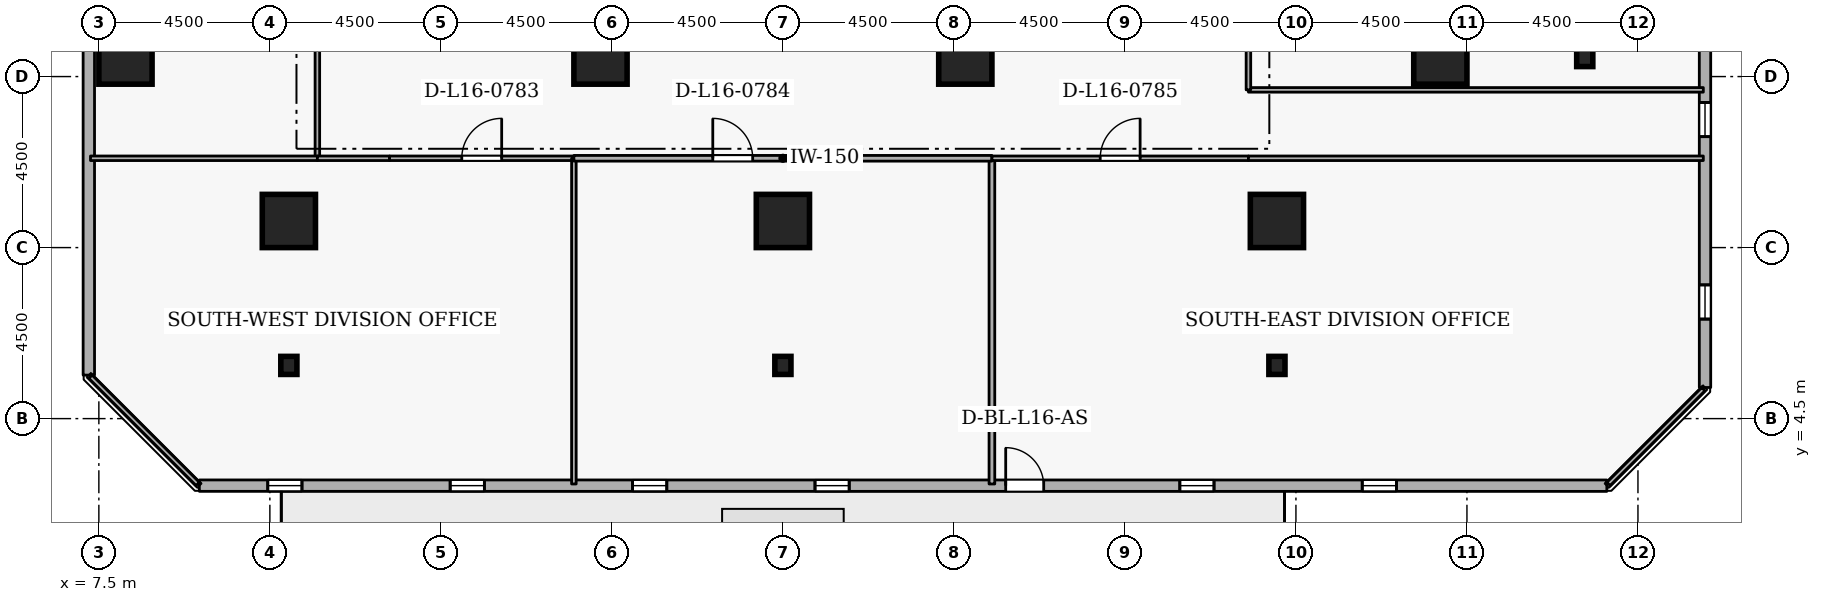
"""IFC4 building model, lengths in metres.
Left out: names, types, materials, properties, quantities, classifications, styles, units other than length and angle.
Written with IfcOpenShell. Run it as: python <this file> out.ifc"""

import sys

from ifc_helpers import new_model, si_unit, direction, frame, frame_2d, origin, origin_2d, place, context, subcontext, project, spatial, rectangle, i_section, extrude, element, fill, save


model = new_model("IFC4")
c1 = context("Model", 3, precision=1e-05, world=origin(), true_north=direction((0.0, 1.0)))
c2 = subcontext(c1, "Body", "Model", "MODEL_VIEW")
j1 = project(units=[si_unit("LENGTHUNIT", "METRE"), si_unit("PLANEANGLEUNIT", "RADIAN")], contexts=[c1])
p1 = place(None, origin())
s1 = spatial("IfcSite", under=j1, at=p1, CompositionType="ELEMENT")
p2 = place(p1, origin())
s2 = spatial("IfcBuilding", under=s1, at=p2, CompositionType="ELEMENT")
p3 = place(p2, frame((0.0, 0.0, 64.5)))
s3 = spatial("IfcBuildingStorey", under=s2, at=p3, CompositionType="ELEMENT", Elevation=64.5)
for number, where, z_axis, x_axis in (
    (1, (12.5, 9.7, 0.0), (0.0, 0.0, 1.0), (1.0, 0.0, 0.0)),
    (2, (25.5, 9.7, 0.0), (0.0, 0.0, 1.0), (1.0, 0.0, 0.0)),
    (3, (38.5, 9.7, 0.0), (0.0, 0.0, 1.0), (1.0, 0.0, 0.0)),
    (4, (42.8, 14.0, 0.0), (0.0, 0.0, 1.0), (1.0, 0.0, 0.0)),
    (5, (8.2, 14.0, 0.0), (0.0, 0.0, 1.0), (1.0, 0.0, 0.0)),
    (6, (20.7, 14.0, 0.0), (0.0, 0.0, 1.0), (1.0, 0.0, 0.0)),
    (7, (30.3, 14.0, 0.0), (0.0, 0.0, 1.0), (1.0, 0.0, 0.0)),
):
    element("IfcColumn", number, at=place(p3, frame(where, z_axis=z_axis, x_axis=x_axis)), inside=s3, PredefinedType="COLUMN", context=c2, shape_type="SweptSolid", body=[
        extrude(rectangle(XDim=1.4, YDim=1.4, at=origin_2d()), origin(), (0.0, 0.0, 1.0), 3.6),
    ])
for number, where, z_axis, x_axis in (
    (8, (12.5, 5.9, 0.0), (0.0, 0.0, 1.0), (1.0, 0.0, 0.0)),
    (9, (25.5, 5.9, 0.0), (0.0, 0.0, 1.0), (1.0, 0.0, 0.0)),
    (10, (38.5, 5.9, 0.0), (0.0, 0.0, 1.0), (1.0, 0.0, 0.0)),
    (11, (46.6, 14.0, 0.0), (0.0, 0.0, 1.0), (1.0, 0.0, 0.0)),
):
    element("IfcColumn", number, at=place(p3, frame(where, z_axis=z_axis, x_axis=x_axis)), inside=s3, PredefinedType="COLUMN", context=c2, shape_type="SweptSolid", body=[
        extrude(i_section(OverallWidth=0.424, OverallDepth=0.475, WebThickness=0.048, FlangeThickness=0.077, FilletRadius=0.015, at=origin_2d()), origin(), (0.0, 0.0, 1.0), 3.6),
    ])
p4 = place(p3, frame((10.145, 2.736, 0.0), z_axis=(0.0, 0.0, 1.0), x_axis=(0.999999999457, -3.2959355e-05, 0.0)))
e12 = element("IfcWall", 12, at=p4, inside=s3, PredefinedType="STANDARD", context=c2, shape_type="SweptSolid", body=[
    extrude(rectangle(XDim=37.037, YDim=0.3, at=frame_2d((18.518, 0.0))), origin(), (0.0, 0.0, 1.0), 2.7),
])
p5 = place(p4, frame((21.218, 0.0, 0.0)))
e13 = element("IfcOpeningElement", 13, at=p5, cuts=e12, PredefinedType="OPENING", context=c2, shape_type="SweptSolid", body=[
    extrude(rectangle(XDim=1.0, YDim=2.08, at=frame_2d((0.5, 1.04))), frame((0.0, 0.16, 0.0), z_axis=(0.0, -1.0, 0.0), x_axis=(1.0, 0.0, 0.0)), (0.0, 0.0, 1.0), 0.32),
])
p6 = place(p4, frame((1.8, 0.0, 0.72)))
e14 = element("IfcOpeningElement", 14, at=p6, cuts=e12, PredefinedType="OPENING", context=c2, shape_type="SweptSolid", body=[
    extrude(rectangle(XDim=0.9, YDim=1.75, at=frame_2d((0.45, 0.875))), frame((0.0, 0.16, 0.0), z_axis=(0.0, -1.0, 0.0), x_axis=(1.0, 0.0, 0.0)), (0.0, 0.0, 1.0), 0.32),
])
p7 = place(p4, frame((6.6, 0.0, 0.72)))
e15 = element("IfcOpeningElement", 15, at=p7, cuts=e12, PredefinedType="OPENING", context=c2, shape_type="SweptSolid", body=[
    extrude(rectangle(XDim=0.9, YDim=1.75, at=frame_2d((0.45, 0.875))), frame((0.0, 0.16, 0.0), z_axis=(0.0, -1.0, 0.0), x_axis=(1.0, 0.0, 0.0)), (0.0, 0.0, 1.0), 0.32),
])
p8 = place(p4, frame((11.4, 0.0, 0.72)))
e16 = element("IfcOpeningElement", 16, at=p8, cuts=e12, PredefinedType="OPENING", context=c2, shape_type="SweptSolid", body=[
    extrude(rectangle(XDim=0.9, YDim=1.75, at=frame_2d((0.45, 0.875))), frame((0.0, 0.16, 0.0), z_axis=(0.0, -1.0, 0.0), x_axis=(1.0, 0.0, 0.0)), (0.0, 0.0, 1.0), 0.32),
])
p9 = place(p4, frame((16.2, 0.0, 0.72)))
e17 = element("IfcOpeningElement", 17, at=p9, cuts=e12, PredefinedType="OPENING", context=c2, shape_type="SweptSolid", body=[
    extrude(rectangle(XDim=0.9, YDim=1.75, at=frame_2d((0.45, 0.875))), frame((0.0, 0.16, 0.0), z_axis=(0.0, -1.0, 0.0), x_axis=(1.0, 0.0, 0.0)), (0.0, 0.0, 1.0), 0.32),
])
p10 = place(p4, frame((25.8, 0.0, 0.72)))
e18 = element("IfcOpeningElement", 18, at=p10, cuts=e12, PredefinedType="OPENING", context=c2, shape_type="SweptSolid", body=[
    extrude(rectangle(XDim=0.9, YDim=1.75, at=frame_2d((0.45, 0.875))), frame((0.0, 0.16, 0.0), z_axis=(0.0, -1.0, 0.0), x_axis=(1.0, 0.0, 0.0)), (0.0, 0.0, 1.0), 0.32),
])
p11 = place(p4, frame((30.6, 0.0, 0.72)))
e19 = element("IfcOpeningElement", 19, at=p11, cuts=e12, PredefinedType="OPENING", context=c2, shape_type="SweptSolid", body=[
    extrude(rectangle(XDim=0.9, YDim=1.75, at=frame_2d((0.45, 0.875))), frame((0.0, 0.16, 0.0), z_axis=(0.0, -1.0, 0.0), x_axis=(1.0, 0.0, 0.0)), (0.0, 0.0, 1.0), 0.32),
])
p12 = place(p3, frame((49.765, 5.319, 0.0), z_axis=(0.0, 0.0, 1.0), x_axis=(-3.2959355e-05, 0.999999999457, 0.0)))
e20 = element("IfcWall", 20, at=p12, inside=s3, PredefinedType="STANDARD", context=c2, shape_type="SweptSolid", body=[
    extrude(rectangle(XDim=37.037, YDim=0.3, at=frame_2d((18.518, 0.0))), origin(), (0.0, 0.0, 1.0), 2.7),
])
p13 = place(p12, frame((1.8, 0.0, 0.72)))
e21 = element("IfcOpeningElement", 21, at=p13, cuts=e20, PredefinedType="OPENING", context=c2, shape_type="SweptSolid", body=[
    extrude(rectangle(XDim=0.9, YDim=1.75, at=frame_2d((0.45, 0.875))), frame((0.0, 0.16, 0.0), z_axis=(0.0, -1.0, 0.0), x_axis=(1.0, 0.0, 0.0)), (0.0, 0.0, 1.0), 0.32),
])
p14 = place(p12, frame((6.6, 0.0, 0.72)))
e22 = element("IfcOpeningElement", 22, at=p14, cuts=e20, PredefinedType="OPENING", context=c2, shape_type="SweptSolid", body=[
    extrude(rectangle(XDim=0.9, YDim=1.75, at=frame_2d((0.45, 0.875))), frame((0.0, 0.16, 0.0), z_axis=(0.0, -1.0, 0.0), x_axis=(1.0, 0.0, 0.0)), (0.0, 0.0, 1.0), 0.32),
])
p15 = place(p12, frame((11.4, 0.0, 0.72)))
e23 = element("IfcOpeningElement", 23, at=p15, cuts=e20, PredefinedType="OPENING", context=c2, shape_type="SweptSolid", body=[
    extrude(rectangle(XDim=0.9, YDim=1.75, at=frame_2d((0.45, 0.875))), frame((0.0, 0.16, 0.0), z_axis=(0.0, -1.0, 0.0), x_axis=(1.0, 0.0, 0.0)), (0.0, 0.0, 1.0), 0.32),
])
p16 = place(p12, frame((16.2, 0.0, 0.72)))
e24 = element("IfcOpeningElement", 24, at=p16, cuts=e20, PredefinedType="OPENING", context=c2, shape_type="SweptSolid", body=[
    extrude(rectangle(XDim=0.9, YDim=1.75, at=frame_2d((0.45, 0.875))), frame((0.0, 0.16, 0.0), z_axis=(0.0, -1.0, 0.0), x_axis=(1.0, 0.0, 0.0)), (0.0, 0.0, 1.0), 0.32),
])
p17 = place(p12, frame((25.8, 0.0, 0.72)))
e25 = element("IfcOpeningElement", 25, at=p17, cuts=e20, PredefinedType="OPENING", context=c2, shape_type="SweptSolid", body=[
    extrude(rectangle(XDim=0.9, YDim=1.75, at=frame_2d((0.45, 0.875))), frame((0.0, 0.16, 0.0), z_axis=(0.0, -1.0, 0.0), x_axis=(1.0, 0.0, 0.0)), (0.0, 0.0, 1.0), 0.32),
])
p18 = place(p12, frame((30.6, 0.0, 0.72)))
e26 = element("IfcOpeningElement", 26, at=p18, cuts=e20, PredefinedType="OPENING", context=c2, shape_type="SweptSolid", body=[
    extrude(rectangle(XDim=0.9, YDim=1.75, at=frame_2d((0.45, 0.875))), frame((0.0, 0.16, 0.0), z_axis=(0.0, -1.0, 0.0), x_axis=(1.0, 0.0, 0.0)), (0.0, 0.0, 1.0), 0.32),
])
p19 = place(p3, frame((7.235, 42.681, 0.0), z_axis=(0.0, 0.0, 1.0), x_axis=(3.2959355e-05, -0.999999999457, 0.0)))
e27 = element("IfcWall", 27, at=p19, inside=s3, PredefinedType="STANDARD", context=c2, shape_type="SweptSolid", body=[
    extrude(rectangle(XDim=37.037, YDim=0.3, at=frame_2d((18.518, 0.0))), origin(), (0.0, 0.0, 1.0), 2.7),
])
p20 = place(p19, frame((6.6, 0.0, 0.72)))
e28 = element("IfcOpeningElement", 28, at=p20, cuts=e27, PredefinedType="OPENING", context=c2, shape_type="SweptSolid", body=[
    extrude(rectangle(XDim=0.9, YDim=1.75, at=frame_2d((0.45, 0.875))), frame((0.0, 0.16, 0.0), z_axis=(0.0, -1.0, 0.0), x_axis=(1.0, 0.0, 0.0)), (0.0, 0.0, 1.0), 0.32),
])
p21 = place(p19, frame((11.4, 0.0, 0.72)))
e29 = element("IfcOpeningElement", 29, at=p21, cuts=e27, PredefinedType="OPENING", context=c2, shape_type="SweptSolid", body=[
    extrude(rectangle(XDim=0.9, YDim=1.75, at=frame_2d((0.45, 0.875))), frame((0.0, 0.16, 0.0), z_axis=(0.0, -1.0, 0.0), x_axis=(1.0, 0.0, 0.0)), (0.0, 0.0, 1.0), 0.32),
])
p22 = place(p19, frame((21.0, 0.0, 0.72)))
e30 = element("IfcOpeningElement", 30, at=p22, cuts=e27, PredefinedType="OPENING", context=c2, shape_type="SweptSolid", body=[
    extrude(rectangle(XDim=0.9, YDim=1.75, at=frame_2d((0.45, 0.875))), frame((0.0, 0.16, 0.0), z_axis=(0.0, -1.0, 0.0), x_axis=(1.0, 0.0, 0.0)), (0.0, 0.0, 1.0), 0.32),
])
p23 = place(p19, frame((25.8, 0.0, 0.72)))
e31 = element("IfcOpeningElement", 31, at=p23, cuts=e27, PredefinedType="OPENING", context=c2, shape_type="SweptSolid", body=[
    extrude(rectangle(XDim=0.9, YDim=1.75, at=frame_2d((0.45, 0.875))), frame((0.0, 0.16, 0.0), z_axis=(0.0, -1.0, 0.0), x_axis=(1.0, 0.0, 0.0)), (0.0, 0.0, 1.0), 0.32),
])
p24 = place(p3, frame((13.25, 20.7, 0.0), z_axis=(0.0, 0.0, 1.0), x_axis=(0.0, -1.0, 0.0)))
e32 = element("IfcWall", 32, at=p24, inside=s3, PredefinedType="PARTITIONING", context=c2, shape_type="SweptSolid", body=[
    extrude(rectangle(XDim=9.35, YDim=0.12, at=frame_2d((4.675, 0.0))), origin(), (0.0, 0.0, 1.0), 3.34),
])
p25 = place(p24, frame((4.15, 0.0, 0.0)))
e33 = element("IfcOpeningElement", 33, at=p25, cuts=e32, PredefinedType="OPENING", context=c2, shape_type="SweptSolid", body=[
    extrude(rectangle(XDim=1.05, YDim=2.1, at=frame_2d((0.525, 1.05))), frame((0.0, 0.07, 0.0), z_axis=(0.0, -1.0, 0.0), x_axis=(1.0, 0.0, 0.0)), (0.0, 0.0, 1.0), 0.14),
])
p26 = place(p3, frame((13.25, 11.35, 0.0), z_axis=(0.0, 0.0, 1.0), x_axis=(-1.0, 0.0, 0.0)))
e34 = element("IfcWall", 34, at=p26, inside=s3, PredefinedType="PARTITIONING", context=c2, shape_type="SweptSolid", body=[
    extrude(rectangle(XDim=5.97, YDim=0.12, at=frame_2d((2.985, 0.0))), origin(), (0.0, 0.0, 1.0), 3.34),
])
p27 = place(p3, frame((49.72, 13.15, 0.0), z_axis=(0.0, 0.0, 1.0), x_axis=(-1.0, 0.0, 0.0)))
e35 = element("IfcWall", 35, at=p27, inside=s3, PredefinedType="PARTITIONING", context=c2, shape_type="SweptSolid", body=[
    extrude(rectangle(XDim=11.97, YDim=0.12, at=frame_2d((5.985, 0.0))), origin(), (0.0, 0.0, 1.0), 3.34),
])
p28 = place(p3, frame((37.75, 13.15, 0.0), z_axis=(0.0, 0.0, 1.0), x_axis=(0.0, 1.0, 0.0)))
e36 = element("IfcWall", 36, at=p28, inside=s3, PredefinedType="PARTITIONING", context=c2, shape_type="SweptSolid", body=[
    extrude(rectangle(XDim=1.862, YDim=0.12, at=frame_2d((0.931, 0.0))), origin(), (0.0, 0.0, 1.0), 3.34),
])
p29 = place(p3, frame((13.25, 11.35, 0.0), z_axis=(0.0, 0.0, 1.0), x_axis=(1.0, 0.0, 0.0)))
e37 = element("IfcWall", 37, at=p29, inside=s3, PredefinedType="PARTITIONING", context=c2, shape_type="SweptSolid", body=[
    extrude(rectangle(XDim=1.9, YDim=0.12, at=frame_2d((0.95, 0.0))), origin(), (0.0, 0.0, 1.0), 3.34),
])
p30 = place(p3, frame((15.15, 11.35, 0.0), z_axis=(0.0, 0.0, 1.0), x_axis=(1.0, 0.0, 0.0)))
e38 = element("IfcWall", 38, at=p30, inside=s3, PredefinedType="PARTITIONING", context=c2, shape_type="SweptSolid", body=[
    extrude(rectangle(XDim=4.85, YDim=0.12, at=frame_2d((2.425, 0.0))), origin(), (0.0, 0.0, 1.0), 3.34),
])
p31 = place(p30, frame((1.9, 0.0, 0.0)))
e39 = element("IfcOpeningElement", 39, at=p31, cuts=e38, PredefinedType="OPENING", context=c2, shape_type="SweptSolid", body=[
    extrude(rectangle(XDim=1.05, YDim=2.1, at=frame_2d((0.525, 1.05))), frame((0.0, 0.07, 0.0), z_axis=(0.0, -1.0, 0.0), x_axis=(1.0, 0.0, 0.0)), (0.0, 0.0, 1.0), 0.14),
])
p32 = place(p3, frame((20.0, 11.35, 0.0), z_axis=(0.0, 0.0, 1.0), x_axis=(0.0, -1.0, 0.0)))
e40 = element("IfcWall", 40, at=p32, inside=s3, PredefinedType="PARTITIONING", context=c2, shape_type="SweptSolid", body=[
    extrude(rectangle(XDim=8.57, YDim=0.12, at=frame_2d((4.285, 0.0))), origin(), (0.0, 0.0, 1.0), 3.34),
])
p33 = place(p3, frame((10.102, 2.78, 0.0), z_axis=(0.0, 0.0, 1.0), x_axis=(-0.707106781187, 0.707106781187, 0.0)))
e41 = element("IfcWall", 41, at=p33, inside=s3, PredefinedType="PARTITIONING", context=c2, shape_type="SweptSolid", body=[
    extrude(rectangle(XDim=3.99, YDim=0.12, at=frame_2d((1.995, 0.0))), origin(), (0.0, 0.0, 1.0), 3.34),
])
p34 = place(p3, frame((31.0, 11.35, 0.0), z_axis=(0.0, 0.0, 1.0), x_axis=(0.0, -1.0, 0.0)))
e42 = element("IfcWall", 42, at=p34, inside=s3, PredefinedType="PARTITIONING", context=c2, shape_type="SweptSolid", body=[
    extrude(rectangle(XDim=8.57, YDim=0.15, at=frame_2d((4.285, 0.0))), origin(), (0.0, 0.0, 1.0), 3.34),
])
p35 = place(p3, frame((20.0, 11.35, 0.0), z_axis=(0.0, 0.0, 1.0), x_axis=(1.0, 0.0, 0.0)))
e43 = element("IfcWall", 43, at=p35, inside=s3, PredefinedType="PARTITIONING", context=c2, shape_type="SweptSolid", body=[
    extrude(rectangle(XDim=11.0, YDim=0.15, at=frame_2d((5.5, 0.0))), origin(), (0.0, 0.0, 1.0), 3.34),
])
p36 = place(p35, frame((3.655, 0.0, 0.0)))
e44 = element("IfcOpeningElement", 44, at=p36, cuts=e43, PredefinedType="OPENING", context=c2, shape_type="SweptSolid", body=[
    extrude(rectangle(XDim=1.05, YDim=2.1, at=frame_2d((0.525, 1.05))), frame((0.0, 0.085, 0.0), z_axis=(0.0, -1.0, 0.0), x_axis=(1.0, 0.0, 0.0)), (0.0, 0.0, 1.0), 0.17),
])
p37 = place(p3, frame((31.0, 11.35, 0.0), z_axis=(0.0, 0.0, 1.0), x_axis=(1.0, 0.0, 0.0)))
e45 = element("IfcWall", 45, at=p37, inside=s3, PredefinedType="PARTITIONING", context=c2, shape_type="SweptSolid", body=[
    extrude(rectangle(XDim=6.75, YDim=0.12, at=frame_2d((3.375, 0.0))), origin(), (0.0, 0.0, 1.0), 3.34),
])
p38 = place(p37, frame((2.85, 0.0, 0.0)))
e46 = element("IfcOpeningElement", 46, at=p38, cuts=e45, PredefinedType="OPENING", context=c2, shape_type="SweptSolid", body=[
    extrude(rectangle(XDim=1.05, YDim=2.1, at=frame_2d((0.525, 1.05))), frame((0.0, 0.07, 0.0), z_axis=(0.0, -1.0, 0.0), x_axis=(1.0, 0.0, 0.0)), (0.0, 0.0, 1.0), 0.14),
])
p39 = place(p3, frame((37.75, 11.35, 0.0), z_axis=(0.0, 0.0, 1.0), x_axis=(1.0, 0.0, 0.0)))
e47 = element("IfcWall", 47, at=p39, inside=s3, PredefinedType="PARTITIONING", context=c2, shape_type="SweptSolid", body=[
    extrude(rectangle(XDim=11.97, YDim=0.12, at=frame_2d((5.985, 0.0))), origin(), (0.0, 0.0, 1.0), 3.34),
])
p40 = place(p3, frame((49.72, 5.275, 0.0), z_axis=(0.0, 0.0, 1.0), x_axis=(-0.707106781187, -0.707106781187, 0.0)))
e48 = element("IfcWall", 48, at=p40, inside=s3, PredefinedType="PARTITIONING", context=c2, shape_type="SweptSolid", body=[
    extrude(rectangle(XDim=3.528, YDim=0.12, at=frame_2d((1.764, 0.0))), origin(), (0.0, 0.0, 1.0), 3.34),
])
p41 = place(p5, origin())
e49 = element("IfcDoor", 49, at=p41, inside=s3, OperationType="SINGLE_SWING_LEFT", PredefinedType="DOOR", context=c2, shape_type="SweptSolid", body=[
    extrude(rectangle(XDim=1.0, YDim=2.08, at=frame_2d((0.5, 1.04))), frame((0.0, 0.025, 0.0), z_axis=(0.0, -1.0, 0.0), x_axis=(1.0, 0.0, 0.0)), (0.0, 0.0, 1.0), 0.05),
])
fill(e13, e49)
p42 = place(p6, origin())
e50 = element("IfcWindow", 50, at=p42, inside=s3, PartitioningType="SINGLE_PANEL", PredefinedType="WINDOW", context=c2, shape_type="SweptSolid", body=[
    extrude(rectangle(XDim=0.9, YDim=1.75, at=frame_2d((0.45, 0.875))), frame((0.0, 0.03, 0.0), z_axis=(0.0, -1.0, 0.0), x_axis=(1.0, 0.0, 0.0)), (0.0, 0.0, 1.0), 0.06),
])
fill(e14, e50)
p43 = place(p7, origin())
e51 = element("IfcWindow", 51, at=p43, inside=s3, PartitioningType="SINGLE_PANEL", PredefinedType="WINDOW", context=c2, shape_type="SweptSolid", body=[
    extrude(rectangle(XDim=0.9, YDim=1.75, at=frame_2d((0.45, 0.875))), frame((0.0, 0.03, 0.0), z_axis=(0.0, -1.0, 0.0), x_axis=(1.0, 0.0, 0.0)), (0.0, 0.0, 1.0), 0.06),
])
fill(e15, e51)
p44 = place(p8, origin())
e52 = element("IfcWindow", 52, at=p44, inside=s3, PartitioningType="SINGLE_PANEL", PredefinedType="WINDOW", context=c2, shape_type="SweptSolid", body=[
    extrude(rectangle(XDim=0.9, YDim=1.75, at=frame_2d((0.45, 0.875))), frame((0.0, 0.03, 0.0), z_axis=(0.0, -1.0, 0.0), x_axis=(1.0, 0.0, 0.0)), (0.0, 0.0, 1.0), 0.06),
])
fill(e16, e52)
p45 = place(p9, origin())
e53 = element("IfcWindow", 53, at=p45, inside=s3, PartitioningType="SINGLE_PANEL", PredefinedType="WINDOW", context=c2, shape_type="SweptSolid", body=[
    extrude(rectangle(XDim=0.9, YDim=1.75, at=frame_2d((0.45, 0.875))), frame((0.0, 0.03, 0.0), z_axis=(0.0, -1.0, 0.0), x_axis=(1.0, 0.0, 0.0)), (0.0, 0.0, 1.0), 0.06),
])
fill(e17, e53)
p46 = place(p10, origin())
e54 = element("IfcWindow", 54, at=p46, inside=s3, PartitioningType="SINGLE_PANEL", PredefinedType="WINDOW", context=c2, shape_type="SweptSolid", body=[
    extrude(rectangle(XDim=0.9, YDim=1.75, at=frame_2d((0.45, 0.875))), frame((0.0, 0.03, 0.0), z_axis=(0.0, -1.0, 0.0), x_axis=(1.0, 0.0, 0.0)), (0.0, 0.0, 1.0), 0.06),
])
fill(e18, e54)
p47 = place(p11, origin())
e55 = element("IfcWindow", 55, at=p47, inside=s3, PartitioningType="SINGLE_PANEL", PredefinedType="WINDOW", context=c2, shape_type="SweptSolid", body=[
    extrude(rectangle(XDim=0.9, YDim=1.75, at=frame_2d((0.45, 0.875))), frame((0.0, 0.03, 0.0), z_axis=(0.0, -1.0, 0.0), x_axis=(1.0, 0.0, 0.0)), (0.0, 0.0, 1.0), 0.06),
])
fill(e19, e55)
p48 = place(p13, origin())
e56 = element("IfcWindow", 56, at=p48, inside=s3, PartitioningType="SINGLE_PANEL", PredefinedType="WINDOW", context=c2, shape_type="SweptSolid", body=[
    extrude(rectangle(XDim=0.9, YDim=1.75, at=frame_2d((0.45, 0.875))), frame((0.0, 0.03, 0.0), z_axis=(0.0, -1.0, 0.0), x_axis=(1.0, 0.0, 0.0)), (0.0, 0.0, 1.0), 0.06),
])
fill(e21, e56)
p49 = place(p14, origin())
e57 = element("IfcWindow", 57, at=p49, inside=s3, PartitioningType="SINGLE_PANEL", PredefinedType="WINDOW", context=c2, shape_type="SweptSolid", body=[
    extrude(rectangle(XDim=0.9, YDim=1.75, at=frame_2d((0.45, 0.875))), frame((0.0, 0.03, 0.0), z_axis=(0.0, -1.0, 0.0), x_axis=(1.0, 0.0, 0.0)), (0.0, 0.0, 1.0), 0.06),
])
fill(e22, e57)
p50 = place(p31, origin())
e58 = element("IfcDoor", 58, at=p50, inside=s3, OperationType="SINGLE_SWING_RIGHT", PredefinedType="DOOR", context=c2, shape_type="SweptSolid", body=[
    extrude(rectangle(XDim=1.05, YDim=2.1, at=frame_2d((0.525, 1.05))), frame((0.0, 0.025, 0.0), z_axis=(0.0, -1.0, 0.0), x_axis=(1.0, 0.0, 0.0)), (0.0, 0.0, 1.0), 0.05),
])
fill(e39, e58)
p51 = place(p36, origin())
e59 = element("IfcDoor", 59, at=p51, inside=s3, OperationType="SINGLE_SWING_LEFT", PredefinedType="DOOR", context=c2, shape_type="SweptSolid", body=[
    extrude(rectangle(XDim=1.05, YDim=2.1, at=frame_2d((0.525, 1.05))), frame((0.0, 0.025, 0.0), z_axis=(0.0, -1.0, 0.0), x_axis=(1.0, 0.0, 0.0)), (0.0, 0.0, 1.0), 0.05),
])
fill(e44, e59)
p52 = place(p38, origin())
e60 = element("IfcDoor", 60, at=p52, inside=s3, OperationType="SINGLE_SWING_RIGHT", PredefinedType="DOOR", context=c2, shape_type="SweptSolid", body=[
    extrude(rectangle(XDim=1.05, YDim=2.1, at=frame_2d((0.525, 1.05))), frame((0.0, 0.025, 0.0), z_axis=(0.0, -1.0, 0.0), x_axis=(1.0, 0.0, 0.0)), (0.0, 0.0, 1.0), 0.05),
])
fill(e46, e60)
save(model, sys.argv[1])
